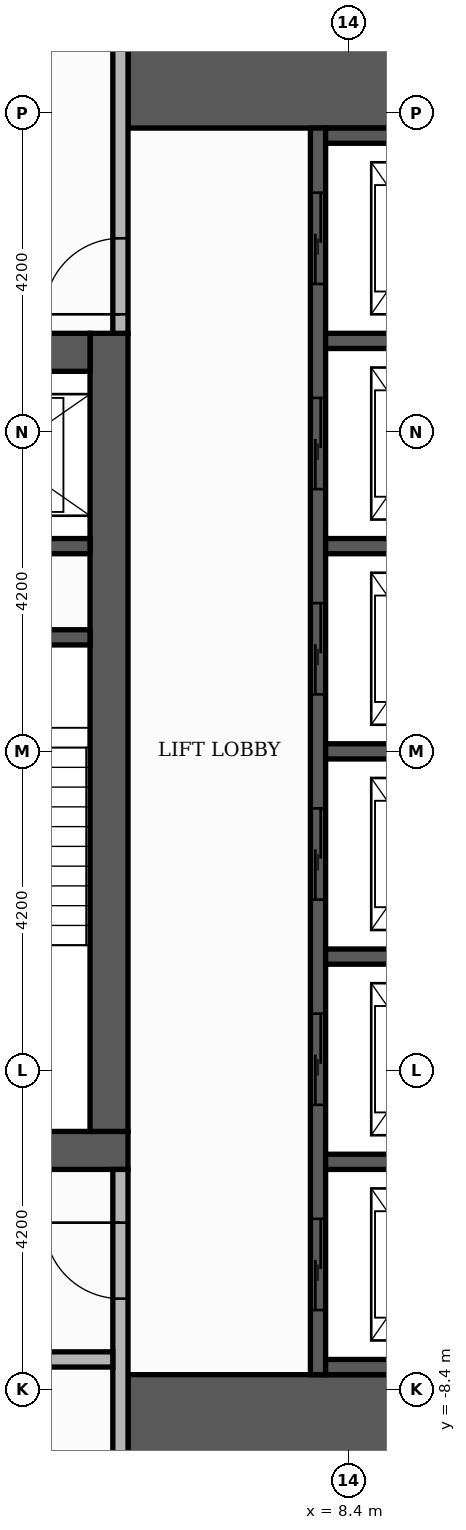
"""IFC4 building model, lengths in metres.
Left out: names, types, materials, properties, quantities, classifications, styles, units other than length and angle.
Written with IfcOpenShell. Run it as: python <this file> out.ifc"""

import sys

from ifc_helpers import new_model, si_unit, direction, frame, frame_2d, origin, place, context, subcontext, project, spatial, rectangle, extrude, element, fill, save


model = new_model("IFC4")
c1 = context("Model", 3, precision=1e-05, world=origin(), true_north=direction((0.0, 1.0)))
c2 = subcontext(c1, "Body", "Model", "MODEL_VIEW")
j1 = project(units=[si_unit("LENGTHUNIT", "METRE"), si_unit("PLANEANGLEUNIT", "RADIAN")], contexts=[c1])
p1 = place(None, origin())
s1 = spatial("IfcSite", under=j1, at=p1, CompositionType="ELEMENT")
p2 = place(p1, origin())
s2 = spatial("IfcBuilding", under=s1, at=p2, CompositionType="ELEMENT")
p3 = place(p2, frame((0.0, 0.0, 145.5)))
s3 = spatial("IfcBuildingStorey", under=s2, at=p3, CompositionType="ELEMENT", Elevation=145.5)
p4 = place(p3, frame((-5.5, -5.25, 0.0), z_axis=(0.0, 0.0, 1.0), x_axis=(1.0, 0.0, 0.0)))
e1 = element("IfcWall", 1, at=p4, inside=s3, PredefinedType="SHEAR", context=c2, shape_type="SweptSolid", body=[
    extrude(rectangle(XDim=11.0, YDim=0.5, at=frame_2d((5.5, 0.0))), origin(), (0.0, 0.0, 1.0), 3.48),
])
p5 = place(p4, frame((4.9, 0.0, 0.0)))
e2 = element("IfcOpeningElement", 2, at=p5, cuts=e1, PredefinedType="OPENING", context=c2, shape_type="SweptSolid", body=[
    extrude(rectangle(XDim=1.2, YDim=2.1, at=frame_2d((0.6, 1.05))), frame((0.0, 0.26, 0.0), z_axis=(0.0, -1.0, 0.0), x_axis=(1.0, 0.0, 0.0)), (0.0, 0.0, 1.0), 0.52),
])
p6 = place(p3, frame((5.25, -5.0, 0.0), z_axis=(0.0, 0.0, 1.0), x_axis=(0.0, 1.0, 0.0)))
e3 = element("IfcWall", 3, at=p6, inside=s3, PredefinedType="SHEAR", context=c2, shape_type="SweptSolid", body=[
    extrude(rectangle(XDim=10.5, YDim=0.5, at=frame_2d((5.25, 0.0))), origin(), (0.0, 0.0, 1.0), 3.48),
])
p7 = place(p3, frame((-5.0, 5.25, 0.0), z_axis=(0.0, 0.0, 1.0), x_axis=(1.0, 0.0, 0.0)))
e4 = element("IfcWall", 4, at=p7, inside=s3, PredefinedType="SHEAR", context=c2, shape_type="SweptSolid", body=[
    extrude(rectangle(XDim=10.0, YDim=0.5, at=frame_2d((5.0, 0.0))), origin(), (0.0, 0.0, 1.0), 3.48),
])
p8 = place(p7, frame((4.4, 0.0, 0.0)))
e5 = element("IfcOpeningElement", 5, at=p8, cuts=e4, PredefinedType="OPENING", context=c2, shape_type="SweptSolid", body=[
    extrude(rectangle(XDim=1.2, YDim=2.1, at=frame_2d((0.6, 1.05))), frame((0.0, 0.26, 0.0), z_axis=(0.0, -1.0, 0.0), x_axis=(1.0, 0.0, 0.0)), (0.0, 0.0, 1.0), 0.52),
])
for number, where, z_axis, x_axis in (
    (6, (5.5, -9.15, 0.0), (0.0, 0.0, 1.0), (1.0, 0.0, 0.0)),
    (7, (5.5, 9.15, 0.0), (0.0, 0.0, 1.0), (1.0, 0.0, 0.0)),
):
    element("IfcWall", number, at=place(p3, frame(where, z_axis=z_axis, x_axis=x_axis)), inside=s3, PredefinedType="SHEAR", context=c2, shape_type="SweptSolid", body=[
        extrude(rectangle(XDim=4.6, YDim=1.9, at=frame_2d((2.3, 0.0))), origin(), (0.0, 0.0, 1.0), 3.48),
    ])
p9 = place(p3, frame((2.15, 1.5, 0.0), z_axis=(0.0, 0.0, 1.0), x_axis=(1.0, 0.0, 0.0)))
e8 = element("IfcWall", 8, at=p9, inside=s3, PredefinedType="SHEAR", context=c2, shape_type="SweptSolid", body=[
    extrude(rectangle(XDim=2.85, YDim=0.2, at=frame_2d((1.425, 0.0))), origin(), (0.0, 0.0, 1.0), 3.48),
])
p10 = place(p3, frame((8.0, -8.2, 0.0), z_axis=(0.0, 0.0, 1.0), x_axis=(0.0, 1.0, 0.0)))
e9 = element("IfcWall", 9, at=p10, inside=s3, PredefinedType="SHEAR", context=c2, shape_type="SweptSolid", body=[
    extrude(rectangle(XDim=16.4, YDim=0.2, at=frame_2d((8.2, 0.0))), origin(), (0.0, 0.0, 1.0), 3.48),
])
p11 = place(p10, frame((0.85, 0.0, 0.0)))
e10 = element("IfcOpeningElement", 10, at=p11, cuts=e9, PredefinedType="OPENING", context=c2, shape_type="SweptSolid", body=[
    extrude(rectangle(XDim=1.2, YDim=2.1, at=frame_2d((0.6, 1.05))), frame((0.0, 0.11, 0.0), z_axis=(0.0, -1.0, 0.0), x_axis=(1.0, 0.0, 0.0)), (0.0, 0.0, 1.0), 0.22),
])
p12 = place(p10, frame((3.55, 0.0, 0.0)))
e11 = element("IfcOpeningElement", 11, at=p12, cuts=e9, PredefinedType="OPENING", context=c2, shape_type="SweptSolid", body=[
    extrude(rectangle(XDim=1.2, YDim=2.1, at=frame_2d((0.6, 1.05))), frame((0.0, 0.11, 0.0), z_axis=(0.0, -1.0, 0.0), x_axis=(1.0, 0.0, 0.0)), (0.0, 0.0, 1.0), 0.22),
])
p13 = place(p10, frame((6.25, 0.0, 0.0)))
e12 = element("IfcOpeningElement", 12, at=p13, cuts=e9, PredefinedType="OPENING", context=c2, shape_type="SweptSolid", body=[
    extrude(rectangle(XDim=1.2, YDim=2.1, at=frame_2d((0.6, 1.05))), frame((0.0, 0.11, 0.0), z_axis=(0.0, -1.0, 0.0), x_axis=(1.0, 0.0, 0.0)), (0.0, 0.0, 1.0), 0.22),
])
p14 = place(p10, frame((8.95, 0.0, 0.0)))
e13 = element("IfcOpeningElement", 13, at=p14, cuts=e9, PredefinedType="OPENING", context=c2, shape_type="SweptSolid", body=[
    extrude(rectangle(XDim=1.2, YDim=2.1, at=frame_2d((0.6, 1.05))), frame((0.0, 0.11, 0.0), z_axis=(0.0, -1.0, 0.0), x_axis=(1.0, 0.0, 0.0)), (0.0, 0.0, 1.0), 0.22),
])
p15 = place(p10, frame((11.65, 0.0, 0.0)))
e14 = element("IfcOpeningElement", 14, at=p15, cuts=e9, PredefinedType="OPENING", context=c2, shape_type="SweptSolid", body=[
    extrude(rectangle(XDim=1.2, YDim=2.1, at=frame_2d((0.6, 1.05))), frame((0.0, 0.11, 0.0), z_axis=(0.0, -1.0, 0.0), x_axis=(1.0, 0.0, 0.0)), (0.0, 0.0, 1.0), 0.22),
])
p16 = place(p10, frame((14.35, 0.0, 0.0)))
e15 = element("IfcOpeningElement", 15, at=p16, cuts=e9, PredefinedType="OPENING", context=c2, shape_type="SweptSolid", body=[
    extrude(rectangle(XDim=1.2, YDim=2.1, at=frame_2d((0.6, 1.05))), frame((0.0, 0.11, 0.0), z_axis=(0.0, -1.0, 0.0), x_axis=(1.0, 0.0, 0.0)), (0.0, 0.0, 1.0), 0.22),
])
for number, where, z_axis, x_axis in (
    (16, (8.1, -8.1, 0.0), (0.0, 0.0, 1.0), (1.0, 0.0, 0.0)),
    (17, (8.1, -5.4, 0.0), (0.0, 0.0, 1.0), (1.0, 0.0, 0.0)),
    (18, (8.1, -2.7, 0.0), (0.0, 0.0, 1.0), (1.0, 0.0, 0.0)),
    (19, (8.1, 0.0, 0.0), (0.0, 0.0, 1.0), (1.0, 0.0, 0.0)),
):
    element("IfcWall", number, at=place(p3, frame(where, z_axis=z_axis, x_axis=x_axis)), inside=s3, PredefinedType="SHEAR", context=c2, shape_type="SweptSolid", body=[
        extrude(rectangle(XDim=2.0, YDim=0.2, at=frame_2d((1.0, 0.0))), origin(), (0.0, 0.0, 1.0), 3.48),
    ])
p17 = place(p3, frame((2.15, 2.7, 0.0), z_axis=(0.0, 0.0, 1.0), x_axis=(1.0, 0.0, 0.0)))
e20 = element("IfcWall", 20, at=p17, inside=s3, PredefinedType="SHEAR", context=c2, shape_type="SweptSolid", body=[
    extrude(rectangle(XDim=2.85, YDim=0.2, at=frame_2d((1.425, 0.0))), origin(), (0.0, 0.0, 1.0), 3.48),
])
for number, where, z_axis, x_axis in (
    (21, (8.1, 2.7, 0.0), (0.0, 0.0, 1.0), (1.0, 0.0, 0.0)),
    (22, (8.1, 5.4, 0.0), (0.0, 0.0, 1.0), (1.0, 0.0, 0.0)),
    (23, (8.1, 8.1, 0.0), (0.0, 0.0, 1.0), (1.0, 0.0, 0.0)),
):
    element("IfcWall", number, at=place(p3, frame(where, z_axis=z_axis, x_axis=x_axis)), inside=s3, PredefinedType="SHEAR", context=c2, shape_type="SweptSolid", body=[
        extrude(rectangle(XDim=2.0, YDim=0.2, at=frame_2d((1.0, 0.0))), origin(), (0.0, 0.0, 1.0), 3.48),
    ])
p18 = place(p3, frame((5.4, -10.1, 0.0), z_axis=(0.0, 0.0, 1.0), x_axis=(0.0, 1.0, 0.0)))
e24 = element("IfcWall", 24, at=p18, inside=s3, PredefinedType="PARTITIONING", context=c2, shape_type="SweptSolid", body=[
    extrude(rectangle(XDim=4.6, YDim=0.2, at=frame_2d((2.3, 0.0))), origin(), (0.0, 0.0, 1.0), 3.48),
])
p19 = place(p18, frame((2.9, 0.0, 0.0)))
e25 = element("IfcOpeningElement", 25, at=p19, cuts=e24, PredefinedType="OPENING", context=c2, shape_type="SweptSolid", body=[
    extrude(rectangle(XDim=1.0, YDim=2.1, at=frame_2d((0.5, 1.05))), frame((0.0, 0.11, 0.0), z_axis=(0.0, -1.0, 0.0), x_axis=(1.0, 0.0, 0.0)), (0.0, 0.0, 1.0), 0.22),
])
p20 = place(p3, frame((2.35, -8.0, 0.0), z_axis=(0.0, 0.0, 1.0), x_axis=(1.0, 0.0, 0.0)))
e26 = element("IfcWall", 26, at=p20, inside=s3, PredefinedType="PARTITIONING", context=c2, shape_type="SweptSolid", body=[
    extrude(rectangle(XDim=2.95, YDim=0.2, at=frame_2d((1.475, 0.0))), origin(), (0.0, 0.0, 1.0), 3.48),
])
p21 = place(p20, frame((1.0, 0.0, 0.0)))
e27 = element("IfcOpeningElement", 27, at=p21, cuts=e26, PredefinedType="OPENING", context=c2, shape_type="SweptSolid", body=[
    extrude(rectangle(XDim=0.9, YDim=2.1, at=frame_2d((0.45, 1.05))), frame((0.0, 0.11, 0.0), z_axis=(0.0, -1.0, 0.0), x_axis=(1.0, 0.0, 0.0)), (0.0, 0.0, 1.0), 0.22),
])
p22 = place(p3, frame((5.4, 5.5, 0.0), z_axis=(0.0, 0.0, 1.0), x_axis=(0.0, 1.0, 0.0)))
e28 = element("IfcWall", 28, at=p22, inside=s3, PredefinedType="PARTITIONING", context=c2, shape_type="SweptSolid", body=[
    extrude(rectangle(XDim=4.6, YDim=0.2, at=frame_2d((2.3, 0.0))), origin(), (0.0, 0.0, 1.0), 3.48),
])
p23 = place(p22, frame((0.25, 0.0, 0.0)))
e29 = element("IfcOpeningElement", 29, at=p23, cuts=e28, PredefinedType="OPENING", context=c2, shape_type="SweptSolid", body=[
    extrude(rectangle(XDim=1.0, YDim=2.1, at=frame_2d((0.5, 1.05))), frame((0.0, 0.11, 0.0), z_axis=(0.0, -1.0, 0.0), x_axis=(1.0, 0.0, 0.0)), (0.0, 0.0, 1.0), 0.22),
])
p24 = place(p11, origin())
e30 = element("IfcDoor", 30, at=p24, inside=s3, OperationType="SLIDING_TO_LEFT", PredefinedType="DOOR", context=c2, shape_type="SweptSolid", body=[
    extrude(rectangle(XDim=1.2, YDim=2.1, at=frame_2d((0.6, 1.05))), frame((0.0, 0.025, 0.0), z_axis=(0.0, -1.0, 0.0), x_axis=(1.0, 0.0, 0.0)), (0.0, 0.0, 1.0), 0.05),
])
fill(e10, e30)
p25 = place(p12, origin())
e31 = element("IfcDoor", 31, at=p25, inside=s3, OperationType="SLIDING_TO_LEFT", PredefinedType="DOOR", context=c2, shape_type="SweptSolid", body=[
    extrude(rectangle(XDim=1.2, YDim=2.1, at=frame_2d((0.6, 1.05))), frame((0.0, 0.025, 0.0), z_axis=(0.0, -1.0, 0.0), x_axis=(1.0, 0.0, 0.0)), (0.0, 0.0, 1.0), 0.05),
])
fill(e11, e31)
p26 = place(p13, origin())
e32 = element("IfcDoor", 32, at=p26, inside=s3, OperationType="SLIDING_TO_LEFT", PredefinedType="DOOR", context=c2, shape_type="SweptSolid", body=[
    extrude(rectangle(XDim=1.2, YDim=2.1, at=frame_2d((0.6, 1.05))), frame((0.0, 0.025, 0.0), z_axis=(0.0, -1.0, 0.0), x_axis=(1.0, 0.0, 0.0)), (0.0, 0.0, 1.0), 0.05),
])
fill(e12, e32)
p27 = place(p14, origin())
e33 = element("IfcDoor", 33, at=p27, inside=s3, OperationType="SLIDING_TO_LEFT", PredefinedType="DOOR", context=c2, shape_type="SweptSolid", body=[
    extrude(rectangle(XDim=1.2, YDim=2.1, at=frame_2d((0.6, 1.05))), frame((0.0, 0.025, 0.0), z_axis=(0.0, -1.0, 0.0), x_axis=(1.0, 0.0, 0.0)), (0.0, 0.0, 1.0), 0.05),
])
fill(e13, e33)
p28 = place(p15, origin())
e34 = element("IfcDoor", 34, at=p28, inside=s3, OperationType="SLIDING_TO_LEFT", PredefinedType="DOOR", context=c2, shape_type="SweptSolid", body=[
    extrude(rectangle(XDim=1.2, YDim=2.1, at=frame_2d((0.6, 1.05))), frame((0.0, 0.025, 0.0), z_axis=(0.0, -1.0, 0.0), x_axis=(1.0, 0.0, 0.0)), (0.0, 0.0, 1.0), 0.05),
])
fill(e14, e34)
p29 = place(p16, origin())
e35 = element("IfcDoor", 35, at=p29, inside=s3, OperationType="SLIDING_TO_LEFT", PredefinedType="DOOR", context=c2, shape_type="SweptSolid", body=[
    extrude(rectangle(XDim=1.2, YDim=2.1, at=frame_2d((0.6, 1.05))), frame((0.0, 0.025, 0.0), z_axis=(0.0, -1.0, 0.0), x_axis=(1.0, 0.0, 0.0)), (0.0, 0.0, 1.0), 0.05),
])
fill(e15, e35)
p30 = place(p23, origin())
e36 = element("IfcDoor", 36, at=p30, inside=s3, OperationType="SINGLE_SWING_LEFT", PredefinedType="DOOR", context=c2, shape_type="SweptSolid", body=[
    extrude(rectangle(XDim=1.0, YDim=2.1, at=frame_2d((0.5, 1.05))), frame((0.0, 0.025, 0.0), z_axis=(0.0, -1.0, 0.0), x_axis=(1.0, 0.0, 0.0)), (0.0, 0.0, 1.0), 0.05),
])
fill(e29, e36)
p31 = place(p19, origin())
e37 = element("IfcDoor", 37, at=p31, inside=s3, OperationType="SINGLE_SWING_RIGHT", PredefinedType="DOOR", context=c2, shape_type="SweptSolid", body=[
    extrude(rectangle(XDim=1.0, YDim=2.1, at=frame_2d((0.5, 1.05))), frame((0.0, 0.025, 0.0), z_axis=(0.0, -1.0, 0.0), x_axis=(1.0, 0.0, 0.0)), (0.0, 0.0, 1.0), 0.05),
])
fill(e25, e37)
save(model, sys.argv[1])
